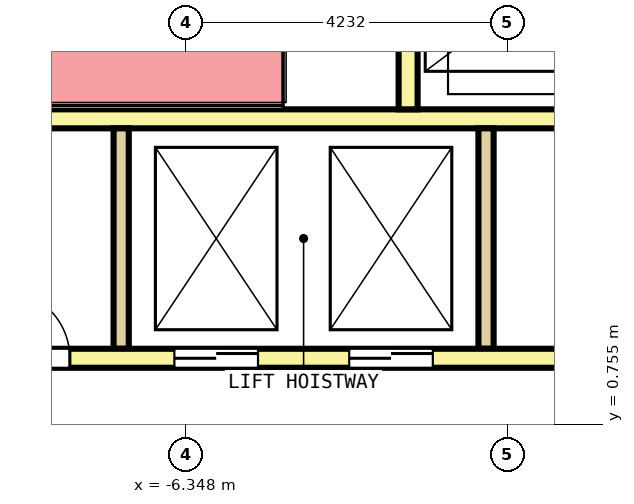
"""IFC4 building model, lengths in metres.
Left out: names, types, materials, properties, quantities, classifications, styles, units other than length and angle.
Written with IfcOpenShell. Run it as: python <this file> out.ifc"""

import sys

from ifc_helpers import new_model, si_unit, direction, frame, frame_2d, origin, place, context, subcontext, project, spatial, rectangle, extrude, element, fill, save


model = new_model("IFC4")
c1 = context("Model", 3, precision=1e-05, world=origin(), true_north=direction((0.0, 1.0)))
c2 = subcontext(c1, "Body", "Model", "MODEL_VIEW")
j1 = project(units=[si_unit("LENGTHUNIT", "METRE"), si_unit("PLANEANGLEUNIT", "RADIAN")], contexts=[c1])
p1 = place(None, origin())
s1 = spatial("IfcSite", under=j1, at=p1, CompositionType="ELEMENT")
p2 = place(p1, origin())
s2 = spatial("IfcBuilding", under=s1, at=p2, CompositionType="ELEMENT")
p3 = place(p2, frame((0.0, 0.0, 122.0)))
s3 = spatial("IfcBuildingStorey", under=s2, at=p3, CompositionType="ELEMENT", Elevation=122.0)
p4 = place(p3, frame((-9.35, 1.625, 0.0), z_axis=(0.0, 0.0, 1.0), x_axis=(1.0, 0.0, 0.0)))
e1 = element("IfcWall", 1, at=p4, inside=s3, PredefinedType="SOLIDWALL", context=c2, shape_type="SweptSolid", body=[
    extrude(rectangle(XDim=18.7, YDim=0.25, at=frame_2d((9.35, 0.0))), origin(), (0.0, 0.0, 1.0), 4.1),
])
p5 = place(p4, frame((2.85, 0.0, 0.0)))
e2 = element("IfcOpeningElement", 2, at=p5, cuts=e1, PredefinedType="OPENING", context=c2, shape_type="SweptSolid", body=[
    extrude(rectangle(XDim=1.1, YDim=2.1, at=frame_2d((0.55, 1.05))), frame((0.0, 0.135, 0.0), z_axis=(0.0, -1.0, 0.0), x_axis=(1.0, 0.0, 0.0)), (0.0, 0.0, 1.0), 0.27),
])
p6 = place(p4, frame((5.15, 0.0, 0.0)))
e3 = element("IfcOpeningElement", 3, at=p6, cuts=e1, PredefinedType="OPENING", context=c2, shape_type="SweptSolid", body=[
    extrude(rectangle(XDim=1.1, YDim=2.1, at=frame_2d((0.55, 1.05))), frame((0.0, 0.135, 0.0), z_axis=(0.0, -1.0, 0.0), x_axis=(1.0, 0.0, 0.0)), (0.0, 0.0, 1.0), 0.27),
])
p7 = place(p4, frame((14.8, 0.0, 0.0)))
e4 = element("IfcOpeningElement", 4, at=p7, cuts=e1, PredefinedType="OPENING", context=c2, shape_type="SweptSolid", body=[
    extrude(rectangle(XDim=1.1, YDim=2.1, at=frame_2d((0.55, 1.05))), frame((0.0, 0.135, 0.0), z_axis=(0.0, -1.0, 0.0), x_axis=(1.0, 0.0, 0.0)), (0.0, 0.0, 1.0), 0.27),
])
p8 = place(p4, frame((0.575, 0.0, 0.0)))
e5 = element("IfcOpeningElement", 5, at=p8, cuts=e1, PredefinedType="OPENING", context=c2, shape_type="SweptSolid", body=[
    extrude(rectangle(XDim=0.9, YDim=2.1, at=frame_2d((0.45, 1.05))), frame((0.0, 0.135, 0.0), z_axis=(0.0, -1.0, 0.0), x_axis=(1.0, 0.0, 0.0)), (0.0, 0.0, 1.0), 0.27),
])
p9 = place(p4, frame((17.225, 0.0, 0.0)))
e6 = element("IfcOpeningElement", 6, at=p9, cuts=e1, PredefinedType="OPENING", context=c2, shape_type="SweptSolid", body=[
    extrude(rectangle(XDim=0.9, YDim=2.1, at=frame_2d((0.45, 1.05))), frame((0.0, 0.135, 0.0), z_axis=(0.0, -1.0, 0.0), x_axis=(1.0, 0.0, 0.0)), (0.0, 0.0, 1.0), 0.27),
])
p10 = place(p3, frame((-9.35, 4.775, 0.0), z_axis=(0.0, 0.0, 1.0), x_axis=(1.0, 0.0, 0.0)))
e7 = element("IfcWall", 7, at=p10, inside=s3, PredefinedType="SOLIDWALL", context=c2, shape_type="SweptSolid", body=[
    extrude(rectangle(XDim=18.7, YDim=0.25, at=frame_2d((9.35, 0.0))), origin(), (0.0, 0.0, 1.0), 4.1),
])
for number, where, z_axis, x_axis in (
    (8, (-7.2, 1.75, 0.0), (0.0, 0.0, 1.0), (0.0, 1.0, 0.0)),
    (9, (-2.4, 1.75, 0.0), (0.0, 0.0, 1.0), (0.0, 1.0, 0.0)),
):
    element("IfcWall", number, at=place(p3, frame(where, z_axis=z_axis, x_axis=x_axis)), inside=s3, PredefinedType="SOLIDWALL", context=c2, shape_type="SweptSolid", body=[
        extrude(rectangle(XDim=2.9, YDim=0.2, at=frame_2d((1.45, 0.0))), origin(), (0.0, 0.0, 1.0), 4.1),
    ])
p11 = place(p3, frame((-3.425, 4.9, 0.0), z_axis=(0.0, 0.0, 1.0), x_axis=(0.0, 1.0, 0.0)))
e10 = element("IfcWall", 10, at=p11, inside=s3, PredefinedType="SOLIDWALL", context=c2, shape_type="SweptSolid", body=[
    extrude(rectangle(XDim=2.8, YDim=0.25, at=frame_2d((1.4, 0.0))), origin(), (0.0, 0.0, 1.0), 4.1),
])
p12 = place(p5, origin())
e11 = element("IfcDoor", 11, at=p12, inside=s3, OperationType="DOUBLE_DOOR_SLIDING", PredefinedType="DOOR", context=c2, shape_type="SweptSolid", body=[
    extrude(rectangle(XDim=1.1, YDim=2.1, at=frame_2d((0.55, 1.05))), frame((0.0, 0.075, 0.0), z_axis=(0.0, -1.0, 0.0), x_axis=(1.0, 0.0, 0.0)), (0.0, 0.0, 1.0), 0.15),
])
fill(e2, e11)
p13 = place(p6, origin())
e12 = element("IfcDoor", 12, at=p13, inside=s3, OperationType="DOUBLE_DOOR_SLIDING", PredefinedType="DOOR", context=c2, shape_type="SweptSolid", body=[
    extrude(rectangle(XDim=1.1, YDim=2.1, at=frame_2d((0.55, 1.05))), frame((0.0, 0.075, 0.0), z_axis=(0.0, -1.0, 0.0), x_axis=(1.0, 0.0, 0.0)), (0.0, 0.0, 1.0), 0.15),
])
fill(e3, e12)
p14 = place(p8, origin())
e13 = element("IfcDoor", 13, at=p14, inside=s3, OperationType="SINGLE_SWING_RIGHT", PredefinedType="DOOR", context=c2, shape_type="SweptSolid", body=[
    extrude(rectangle(XDim=0.9, YDim=2.1, at=frame_2d((0.45, 1.05))), frame((0.0, 0.075, 0.0), z_axis=(0.0, -1.0, 0.0), x_axis=(1.0, 0.0, 0.0)), (0.0, 0.0, 1.0), 0.15),
])
fill(e5, e13)
save(model, sys.argv[1])
